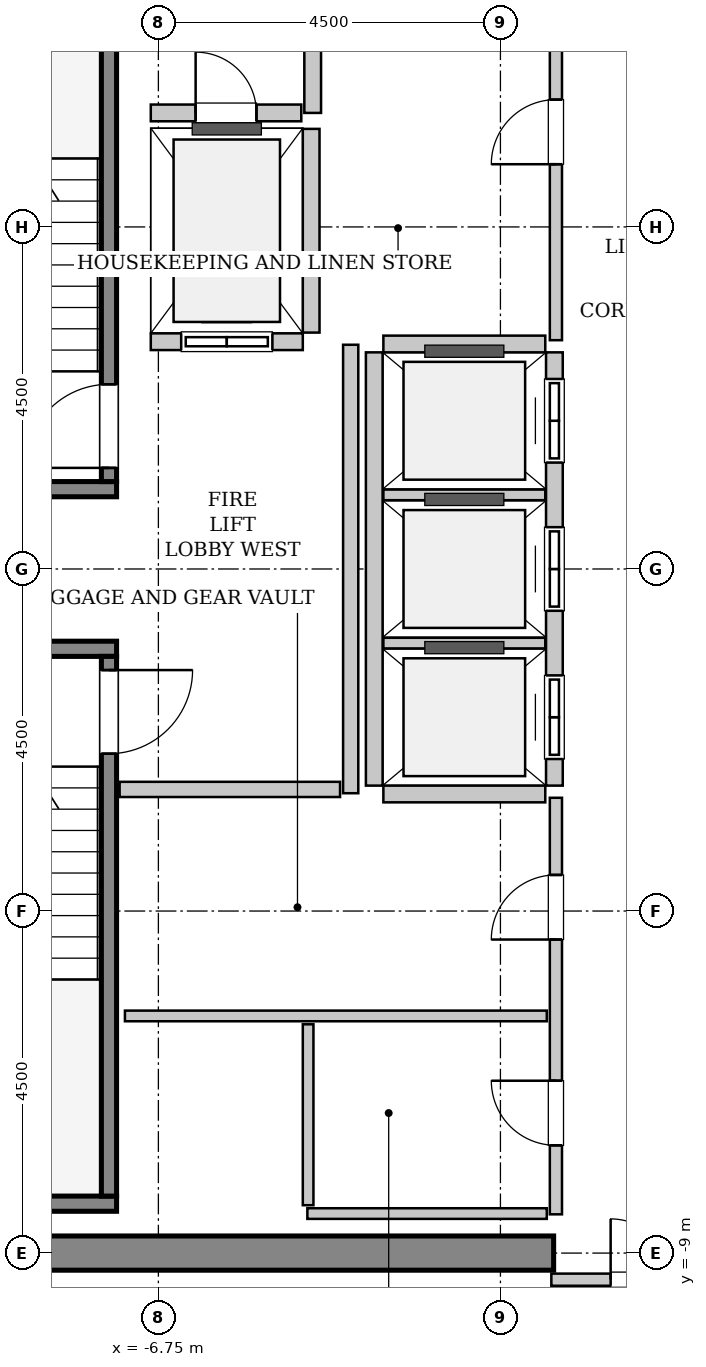
"""IFC4 building model, lengths in metres.
Left out: names, types, materials, properties, quantities, classifications, styles, units other than length and angle.
Written with IfcOpenShell. Run it as: python <this file> out.ifc"""

import sys

from ifc_helpers import new_model, si_unit, direction, frame, frame_2d, origin, place, context, subcontext, project, spatial, rectangle, extrude, source, transform, mapped, element, fill, save


model = new_model("IFC4")
c1 = context("Model", 3, precision=1e-05, world=origin(), true_north=direction((0.0, 1.0)))
c2 = subcontext(c1, "Body", "Model", "MODEL_VIEW")
j1 = project(units=[si_unit("LENGTHUNIT", "METRE"), si_unit("PLANEANGLEUNIT", "RADIAN")], contexts=[c1])
p1 = place(None, origin())
s1 = spatial("IfcSite", under=j1, at=p1, CompositionType="ELEMENT")
p2 = place(p1, origin())
s2 = spatial("IfcBuilding", under=s1, at=p2, CompositionType="ELEMENT")
p3 = place(p2, frame((0.0, 0.0, 306.4)))
s3 = spatial("IfcBuildingStorey", under=s2, at=p3, CompositionType="ELEMENT", Elevation=306.4)
m1 = source(origin(), c2, "Body", "SweptSolid", [
    extrude(rectangle(XDim=9.925, YDim=0.45, at=frame_2d((4.962, 0.0))), origin(), (0.0, 0.0, 1.0), 3.8),
])
p4 = place(p3, frame((-11.475, -9.0, 0.0), z_axis=(0.0, 0.0, 1.0), x_axis=(1.0, 0.0, 0.0)))
e1 = element("IfcWall", 1, at=p4, inside=s3, PredefinedType="SHEAR", context=c2, shape_type="MappedRepresentation", body=[
    mapped(m1, transform((0.0, 0.0, 0.0), x_axis=(1.0, 0.0, 0.0), y_axis=(0.0, 1.0, 0.0), z_axis=(0.0, 0.0, 1.0), scale=1.0)),
])
m2 = source(origin(), c2, "Body", "SweptSolid", [
    extrude(rectangle(XDim=3.4, YDim=0.2, at=frame_2d((1.7, 0.0))), origin(), (0.0, 0.0, 1.0), 3.8),
])
p5 = place(p3, frame((-7.3, 1.05, 0.0), z_axis=(0.0, 0.0, 1.0), x_axis=(-1.0, 0.0, 0.0)))
e2 = element("IfcWall", 2, at=p5, inside=s3, PredefinedType="SOLIDWALL", context=c2, shape_type="MappedRepresentation", body=[
    mapped(m2, transform((0.0, 0.0, 0.0), x_axis=(1.0, 0.0, 0.0), y_axis=(0.0, 1.0, 0.0), z_axis=(0.0, 0.0, 1.0), scale=1.0)),
])
m3 = source(origin(), c2, "Body", "SweptSolid", [
    extrude(rectangle(XDim=7.1, YDim=0.2, at=frame_2d((3.55, 0.0))), origin(), (0.0, 0.0, 1.0), 3.8),
])
p6 = place(p3, frame((-7.4, 1.15, 0.0), z_axis=(0.0, 0.0, 1.0), x_axis=(0.0, 1.0, 0.0)))
e3 = element("IfcWall", 3, at=p6, inside=s3, PredefinedType="SOLIDWALL", context=c2, shape_type="MappedRepresentation", body=[
    mapped(m3, transform((0.0, 0.0, 0.0), x_axis=(1.0, 0.0, 0.0), y_axis=(0.0, 1.0, 0.0), z_axis=(0.0, 0.0, 1.0), scale=1.0)),
])
p7 = place(p6, frame((0.18, 0.0, 0.0)))
e4 = element("IfcOpeningElement", 4, at=p7, cuts=e3, PredefinedType="OPENING", context=c2, shape_type="SweptSolid", body=[
    extrude(rectangle(XDim=1.1, YDim=2.15, at=frame_2d((0.55, 1.075))), frame((0.0, 0.11, 0.0), z_axis=(0.0, -1.0, 0.0), x_axis=(1.0, 0.0, 0.0)), (0.0, 0.0, 1.0), 0.22),
])
p8 = place(p3, frame((-10.7, -1.05, 0.0), z_axis=(0.0, 0.0, 1.0), x_axis=(1.0, 0.0, 0.0)))
e5 = element("IfcWall", 5, at=p8, inside=s3, PredefinedType="SOLIDWALL", context=c2, shape_type="MappedRepresentation", body=[
    mapped(m2, transform((0.0, 0.0, 0.0), x_axis=(1.0, 0.0, 0.0), y_axis=(0.0, 1.0, 0.0), z_axis=(0.0, 0.0, 1.0), scale=1.0)),
])
m4 = source(origin(), c2, "Body", "SweptSolid", [
    extrude(rectangle(XDim=3.73, YDim=0.2, at=frame_2d((1.865, 0.0))), origin(), (0.0, 0.0, 1.0), 3.8),
])
p9 = place(p3, frame((-11.03, -8.35, 0.0), z_axis=(0.0, 0.0, 1.0), x_axis=(1.0, 0.0, 0.0)))
e6 = element("IfcWall", 6, at=p9, inside=s3, PredefinedType="SOLIDWALL", context=c2, shape_type="MappedRepresentation", body=[
    mapped(m4, transform((0.0, 0.0, 0.0), x_axis=(1.0, 0.0, 0.0), y_axis=(0.0, 1.0, 0.0), z_axis=(0.0, 0.0, 1.0), scale=1.0)),
])
p10 = place(p3, frame((-7.4, -1.15, 0.0), z_axis=(0.0, 0.0, 1.0), x_axis=(0.0, -1.0, 0.0)))
e7 = element("IfcWall", 7, at=p10, inside=s3, PredefinedType="SOLIDWALL", context=c2, shape_type="MappedRepresentation", body=[
    mapped(m3, transform((0.0, 0.0, 0.0), x_axis=(1.0, 0.0, 0.0), y_axis=(0.0, 1.0, 0.0), z_axis=(0.0, 0.0, 1.0), scale=1.0)),
])
p11 = place(p10, frame((0.18, 0.0, 0.0)))
e8 = element("IfcOpeningElement", 8, at=p11, cuts=e7, PredefinedType="OPENING", context=c2, shape_type="SweptSolid", body=[
    extrude(rectangle(XDim=1.1, YDim=2.15, at=frame_2d((0.55, 1.075))), frame((0.0, 0.11, 0.0), z_axis=(0.0, -1.0, 0.0), x_axis=(1.0, 0.0, 0.0)), (0.0, 0.0, 1.0), 0.22),
])
m5 = source(origin(), c2, "Body", "SweptSolid", [
    extrude(rectangle(XDim=2.0, YDim=0.22, at=frame_2d((1.0, 0.0))), origin(), (0.0, 0.0, 1.0), 3.535),
])
p12 = place(p3, frame((-6.85, 2.99, 0.0), z_axis=(0.0, 0.0, 1.0), x_axis=(1.0, 0.0, 0.0)))
e9 = element("IfcWall", 9, at=p12, inside=s3, PredefinedType="SOLIDWALL", context=c2, shape_type="MappedRepresentation", body=[
    mapped(m5, transform((0.0, 0.0, 0.0), x_axis=(1.0, 0.0, 0.0), y_axis=(0.0, 1.0, 0.0), z_axis=(0.0, 0.0, 1.0), scale=1.0)),
])
p13 = place(p12, frame((0.4, 0.0, 0.0)))
e10 = element("IfcOpeningElement", 10, at=p13, cuts=e9, PredefinedType="OPENING", context=c2, shape_type="SweptSolid", body=[
    extrude(rectangle(XDim=1.2, YDim=2.2, at=frame_2d((0.6, 1.1))), frame((0.0, 0.12, 0.0), z_axis=(0.0, -1.0, 0.0), x_axis=(1.0, 0.0, 0.0)), (0.0, 0.0, 1.0), 0.24),
])
m6 = source(origin(), c2, "Body", "SweptSolid", [
    extrude(rectangle(XDim=2.68, YDim=0.22, at=frame_2d((1.34, 0.0))), origin(), (0.0, 0.0, 1.0), 3.535),
])
p14 = place(p3, frame((-4.74, 3.11, 0.0), z_axis=(0.0, 0.0, 1.0), x_axis=(0.0, 1.0, 0.0)))
e11 = element("IfcWall", 11, at=p14, inside=s3, PredefinedType="SOLIDWALL", context=c2, shape_type="MappedRepresentation", body=[
    mapped(m6, transform((0.0, 0.0, 0.0), x_axis=(1.0, 0.0, 0.0), y_axis=(0.0, 1.0, 0.0), z_axis=(0.0, 0.0, 1.0), scale=1.0)),
])
m7 = source(origin(), c2, "Body", "SweptSolid", [
    extrude(rectangle(XDim=5.7, YDim=0.22, at=frame_2d((2.85, 0.0))), origin(), (0.0, 0.0, 1.0), 3.535),
])
p15 = place(p3, frame((-1.54, -2.85, 0.0), z_axis=(0.0, 0.0, 1.0), x_axis=(0.0, 1.0, 0.0)))
e12 = element("IfcWall", 12, at=p15, inside=s3, PredefinedType="SOLIDWALL", context=c2, shape_type="MappedRepresentation", body=[
    mapped(m7, transform((0.0, 0.0, 0.0), x_axis=(1.0, 0.0, 0.0), y_axis=(0.0, 1.0, 0.0), z_axis=(0.0, 0.0, 1.0), scale=1.0)),
])
p16 = place(p15, frame((0.35, 0.0, 0.0)))
e13 = element("IfcOpeningElement", 13, at=p16, cuts=e12, PredefinedType="OPENING", context=c2, shape_type="SweptSolid", body=[
    extrude(rectangle(XDim=1.1, YDim=2.2, at=frame_2d((0.55, 1.1))), frame((0.0, 0.12, 0.0), z_axis=(0.0, -1.0, 0.0), x_axis=(1.0, 0.0, 0.0)), (0.0, 0.0, 1.0), 0.24),
])
p17 = place(p15, frame((2.3, 0.0, 0.0)))
e14 = element("IfcOpeningElement", 14, at=p17, cuts=e12, PredefinedType="OPENING", context=c2, shape_type="SweptSolid", body=[
    extrude(rectangle(XDim=1.1, YDim=2.2, at=frame_2d((0.55, 1.1))), frame((0.0, 0.12, 0.0), z_axis=(0.0, -1.0, 0.0), x_axis=(1.0, 0.0, 0.0)), (0.0, 0.0, 1.0), 0.24),
])
p18 = place(p15, frame((4.25, 0.0, 0.0)))
e15 = element("IfcOpeningElement", 15, at=p18, cuts=e12, PredefinedType="OPENING", context=c2, shape_type="SweptSolid", body=[
    extrude(rectangle(XDim=1.1, YDim=2.2, at=frame_2d((0.55, 1.1))), frame((0.0, 0.12, 0.0), z_axis=(0.0, -1.0, 0.0), x_axis=(1.0, 0.0, 0.0)), (0.0, 0.0, 1.0), 0.24),
])
p19 = place(p3, frame((-3.91, 2.85, 0.0), z_axis=(0.0, 0.0, 1.0), x_axis=(0.0, -1.0, 0.0)))
e16 = element("IfcWall", 16, at=p19, inside=s3, PredefinedType="SOLIDWALL", context=c2, shape_type="MappedRepresentation", body=[
    mapped(m7, transform((0.0, 0.0, 0.0), x_axis=(1.0, 0.0, 0.0), y_axis=(0.0, 1.0, 0.0), z_axis=(0.0, 0.0, 1.0), scale=1.0)),
])
m8 = source(origin(), c2, "Body", "SweptSolid", [
    extrude(rectangle(XDim=2.13, YDim=0.22, at=frame_2d((1.065, 0.0))), origin(), (0.0, 0.0, 1.0), 3.535),
])
p20 = place(p3, frame((-3.79, -2.96, 0.0), z_axis=(0.0, 0.0, 1.0), x_axis=(1.0, 0.0, 0.0)))
e17 = element("IfcWall", 17, at=p20, inside=s3, PredefinedType="SOLIDWALL", context=c2, shape_type="MappedRepresentation", body=[
    mapped(m8, transform((0.0, 0.0, 0.0), x_axis=(1.0, 0.0, 0.0), y_axis=(0.0, 1.0, 0.0), z_axis=(0.0, 0.0, 1.0), scale=1.0)),
])
m9 = source(origin(), c2, "Body", "SweptSolid", [
    extrude(rectangle(XDim=2.13, YDim=0.14, at=frame_2d((1.065, 0.0))), origin(), (0.0, 0.0, 1.0), 3.535),
])
for number, where, z_axis, x_axis in (
    (18, (-3.79, -0.975, 0.0), (0.0, 0.0, 1.0), (1.0, 0.0, 0.0)),
    (19, (-3.79, 0.975, 0.0), (0.0, 0.0, 1.0), (1.0, 0.0, 0.0)),
):
    element("IfcWall", number, at=place(p3, frame(where, z_axis=z_axis, x_axis=x_axis)), inside=s3, PredefinedType="PARTITIONING", context=c2, shape_type="MappedRepresentation", body=[
        mapped(m9, transform((0.0, 0.0, 0.0), x_axis=(1.0, 0.0, 0.0), y_axis=(0.0, 1.0, 0.0), z_axis=(0.0, 0.0, 1.0), scale=1.0)),
    ])
p21 = place(p3, frame((-1.66, 2.96, 0.0), z_axis=(0.0, 0.0, 1.0), x_axis=(-1.0, 0.0, 0.0)))
e20 = element("IfcWall", 20, at=p21, inside=s3, PredefinedType="SOLIDWALL", context=c2, shape_type="MappedRepresentation", body=[
    mapped(m8, transform((0.0, 0.0, 0.0), x_axis=(1.0, 0.0, 0.0), y_axis=(0.0, 1.0, 0.0), z_axis=(0.0, 0.0, 1.0), scale=1.0)),
])
m10 = source(origin(), c2, "Body", "SweptSolid", [
    extrude(rectangle(XDim=2.25, YDim=0.22, at=frame_2d((1.125, 0.0))), origin(), (0.0, 0.0, 1.0), 3.535),
])
p22 = place(p3, frame((-4.72, 6.0, 0.0), z_axis=(0.0, 0.0, 1.0), x_axis=(0.0, 1.0, 0.0)))
e21 = element("IfcWall", 21, at=p22, inside=s3, PredefinedType="SOLIDWALL", context=c2, shape_type="MappedRepresentation", body=[
    mapped(m10, transform((0.0, 0.0, 0.0), x_axis=(1.0, 0.0, 0.0), y_axis=(0.0, 1.0, 0.0), z_axis=(0.0, 0.0, 1.0), scale=1.0)),
])
m11 = source(origin(), c2, "Body", "SweptSolid", [
    extrude(rectangle(XDim=1.98, YDim=0.22, at=frame_2d((0.99, 0.0))), origin(), (0.0, 0.0, 1.0), 3.535),
])
p23 = place(p3, frame((-6.85, 6.0, 0.0), z_axis=(0.0, 0.0, 1.0), x_axis=(1.0, 0.0, 0.0)))
e22 = element("IfcWall", 22, at=p23, inside=s3, PredefinedType="SOLIDWALL", context=c2, shape_type="MappedRepresentation", body=[
    mapped(m11, transform((0.0, 0.0, 0.0), x_axis=(1.0, 0.0, 0.0), y_axis=(0.0, 1.0, 0.0), z_axis=(0.0, 0.0, 1.0), scale=1.0)),
])
p24 = place(p23, frame((0.59, 0.0, 0.0)))
e23 = element("IfcOpeningElement", 23, at=p24, cuts=e22, PredefinedType="OPENING", context=c2, shape_type="SweptSolid", body=[
    extrude(rectangle(XDim=0.8, YDim=2.0, at=frame_2d((0.4, 1.0))), frame((0.0, 0.12, 0.0), z_axis=(0.0, -1.0, 0.0), x_axis=(1.0, 0.0, 0.0)), (0.0, 0.0, 1.0), 0.24),
])
m12 = source(origin(), c2, "Body", "SweptSolid", [
    extrude(rectangle(XDim=5.9, YDim=0.2, at=frame_2d((2.95, 0.0))), origin(), (0.0, 0.0, 1.0), 3.535),
])
p25 = place(p3, frame((-4.22, -2.95, 0.0), z_axis=(0.0, 0.0, 1.0), x_axis=(0.0, 1.0, 0.0)))
e24 = element("IfcWall", 24, at=p25, inside=s3, PredefinedType="PARTITIONING", context=c2, shape_type="MappedRepresentation", body=[
    mapped(m12, transform((0.0, 0.0, 0.0), x_axis=(1.0, 0.0, 0.0), y_axis=(0.0, 1.0, 0.0), z_axis=(0.0, 0.0, 1.0), scale=1.0)),
])
m13 = source(origin(), c2, "Body", "SweptSolid", [
    extrude(rectangle(XDim=2.9, YDim=0.2, at=frame_2d((1.45, 0.0))), origin(), (0.0, 0.0, 1.0), 3.535),
])
p26 = place(p3, frame((-7.26, -2.9, 0.0), z_axis=(0.0, 0.0, 1.0), x_axis=(1.0, 0.0, 0.0)))
e25 = element("IfcWall", 25, at=p26, inside=s3, PredefinedType="PARTITIONING", context=c2, shape_type="MappedRepresentation", body=[
    mapped(m13, transform((0.0, 0.0, 0.0), x_axis=(1.0, 0.0, 0.0), y_axis=(0.0, 1.0, 0.0), z_axis=(0.0, 0.0, 1.0), scale=1.0)),
])
m14 = source(origin(), c2, "Body", "SweptSolid", [
    extrude(rectangle(XDim=3.16, YDim=0.16, at=frame_2d((1.58, 0.0))), origin(), (0.0, 0.0, 1.0), 2.625),
])
p27 = place(p3, frame((-1.58, -9.35, 0.0), z_axis=(0.0, 0.0, 1.0), x_axis=(1.0, 0.0, 0.0)))
e26 = element("IfcWall", 26, at=p27, inside=s3, PredefinedType="PARTITIONING", context=c2, shape_type="MappedRepresentation", body=[
    mapped(m14, transform((0.0, 0.0, 0.0), x_axis=(1.0, 0.0, 0.0), y_axis=(0.0, 1.0, 0.0), z_axis=(0.0, 0.0, 1.0), scale=1.0)),
])
p28 = place(p27, frame((0.78, 0.0, 0.0)))
e27 = element("IfcOpeningElement", 27, at=p28, cuts=e26, PredefinedType="OPENING", context=c2, shape_type="SweptSolid", body=[
    extrude(rectangle(XDim=1.6, YDim=2.3, at=frame_2d((0.8, 1.15))), frame((0.0, 0.09, 0.0), z_axis=(0.0, -1.0, 0.0), x_axis=(1.0, 0.0, 0.0)), (0.0, 0.0, 1.0), 0.18),
])
m15 = source(origin(), c2, "Body", "SweptSolid", [
    extrude(rectangle(XDim=5.48, YDim=0.16, at=frame_2d((2.74, 0.0))), origin(), (0.0, 0.0, 1.0), 3.535),
])
p29 = place(p3, frame((-1.52, 3.01, 0.0), z_axis=(0.0, 0.0, 1.0), x_axis=(0.0, 1.0, 0.0)))
e28 = element("IfcWall", 28, at=p29, inside=s3, PredefinedType="PARTITIONING", context=c2, shape_type="MappedRepresentation", body=[
    mapped(m15, transform((0.0, 0.0, 0.0), x_axis=(1.0, 0.0, 0.0), y_axis=(0.0, 1.0, 0.0), z_axis=(0.0, 0.0, 1.0), scale=1.0)),
])
p30 = place(p29, frame((2.315, 0.0, 0.0)))
e29 = element("IfcOpeningElement", 29, at=p30, cuts=e28, PredefinedType="OPENING", context=c2, shape_type="SweptSolid", body=[
    extrude(rectangle(XDim=0.85, YDim=2.1, at=frame_2d((0.425, 1.05))), frame((0.0, 0.09, 0.0), z_axis=(0.0, -1.0, 0.0), x_axis=(1.0, 0.0, 0.0)), (0.0, 0.0, 1.0), 0.18),
])
p31 = place(p3, frame((-1.52, -8.49, 0.0), z_axis=(0.0, 0.0, 1.0), x_axis=(0.0, 1.0, 0.0)))
e30 = element("IfcWall", 30, at=p31, inside=s3, PredefinedType="PARTITIONING", context=c2, shape_type="MappedRepresentation", body=[
    mapped(m15, transform((0.0, 0.0, 0.0), x_axis=(1.0, 0.0, 0.0), y_axis=(0.0, 1.0, 0.0), z_axis=(0.0, 0.0, 1.0), scale=1.0)),
])
p32 = place(p31, frame((0.907, 0.0, 0.0)))
e31 = element("IfcOpeningElement", 31, at=p32, cuts=e30, PredefinedType="OPENING", context=c2, shape_type="SweptSolid", body=[
    extrude(rectangle(XDim=0.85, YDim=2.1, at=frame_2d((0.425, 1.05))), frame((0.0, 0.09, 0.0), z_axis=(0.0, -1.0, 0.0), x_axis=(1.0, 0.0, 0.0)), (0.0, 0.0, 1.0), 0.18),
])
p33 = place(p31, frame((3.615, 0.0, 0.0)))
e32 = element("IfcOpeningElement", 32, at=p33, cuts=e30, PredefinedType="OPENING", context=c2, shape_type="SweptSolid", body=[
    extrude(rectangle(XDim=0.85, YDim=2.1, at=frame_2d((0.425, 1.05))), frame((0.0, 0.09, 0.0), z_axis=(0.0, -1.0, 0.0), x_axis=(1.0, 0.0, 0.0)), (0.0, 0.0, 1.0), 0.18),
])
m16 = source(origin(), c2, "Body", "SweptSolid", [
    extrude(rectangle(XDim=5.55, YDim=0.14, at=frame_2d((2.775, 0.0))), origin(), (0.0, 0.0, 1.0), 3.535),
])
p34 = place(p3, frame((-7.19, -5.88, 0.0), z_axis=(0.0, 0.0, 1.0), x_axis=(1.0, 0.0, 0.0)))
e33 = element("IfcWall", 33, at=p34, inside=s3, PredefinedType="PARTITIONING", context=c2, shape_type="MappedRepresentation", body=[
    mapped(m16, transform((0.0, 0.0, 0.0), x_axis=(1.0, 0.0, 0.0), y_axis=(0.0, 1.0, 0.0), z_axis=(0.0, 0.0, 1.0), scale=1.0)),
])
m17 = source(origin(), c2, "Body", "SweptSolid", [
    extrude(rectangle(XDim=3.15, YDim=0.14, at=frame_2d((1.575, 0.0))), origin(), (0.0, 0.0, 1.0), 3.535),
])
p35 = place(p3, frame((-4.79, -8.48, 0.0), z_axis=(0.0, 0.0, 1.0), x_axis=(1.0, 0.0, 0.0)))
e34 = element("IfcWall", 34, at=p35, inside=s3, PredefinedType="PARTITIONING", context=c2, shape_type="MappedRepresentation", body=[
    mapped(m17, transform((0.0, 0.0, 0.0), x_axis=(1.0, 0.0, 0.0), y_axis=(0.0, 1.0, 0.0), z_axis=(0.0, 0.0, 1.0), scale=1.0)),
])
m18 = source(origin(), c2, "Body", "SweptSolid", [
    extrude(rectangle(XDim=2.38, YDim=0.14, at=frame_2d((1.19, 0.0))), origin(), (0.0, 0.0, 1.0), 3.535),
])
p36 = place(p3, frame((-4.78, -8.37, 0.0), z_axis=(0.0, 0.0, 1.0), x_axis=(0.0, 1.0, 0.0)))
e35 = element("IfcWall", 35, at=p36, inside=s3, PredefinedType="PARTITIONING", context=c2, shape_type="MappedRepresentation", body=[
    mapped(m18, transform((0.0, 0.0, 0.0), x_axis=(1.0, 0.0, 0.0), y_axis=(0.0, 1.0, 0.0), z_axis=(0.0, 0.0, 1.0), scale=1.0)),
])
m19 = source(origin(), c2, "Body", "SweptSolid", [
    extrude(rectangle(XDim=1.1, YDim=2.15, at=frame_2d((0.55, 1.075))), frame((0.0, 0.025, 0.0), z_axis=(0.0, -1.0, 0.0), x_axis=(1.0, 0.0, 0.0)), (0.0, 0.0, 1.0), 0.05),
])
p37 = place(p7, origin())
e36 = element("IfcDoor", 36, at=p37, inside=s3, OperationType="SINGLE_SWING_LEFT", PredefinedType="DOOR", context=c2, shape_type="MappedRepresentation", body=[
    mapped(m19, transform((0.0, 0.0, 0.0), x_axis=(1.0, 0.0, 0.0), y_axis=(0.0, 1.0, 0.0), z_axis=(0.0, 0.0, 1.0), scale=1.0)),
])
fill(e4, e36)
p38 = place(p11, origin())
e37 = element("IfcDoor", 37, at=p38, inside=s3, OperationType="SINGLE_SWING_LEFT", PredefinedType="DOOR", context=c2, shape_type="MappedRepresentation", body=[
    mapped(m19, transform((0.0, 0.0, 0.0), x_axis=(1.0, 0.0, 0.0), y_axis=(0.0, 1.0, 0.0), z_axis=(0.0, 0.0, 1.0), scale=1.0)),
])
fill(e8, e37)
m20 = source(origin(), c2, "Body", "SweptSolid", [
    extrude(rectangle(XDim=1.2, YDim=2.2, at=frame_2d((0.6, 1.1))), frame((0.0, 0.025, 0.0), z_axis=(0.0, -1.0, 0.0), x_axis=(1.0, 0.0, 0.0)), (0.0, 0.0, 1.0), 0.05),
])
p39 = place(p13, origin())
e38 = element("IfcDoor", 38, at=p39, inside=s3, OperationType="SLIDING_TO_LEFT", PredefinedType="DOOR", context=c2, shape_type="MappedRepresentation", body=[
    mapped(m20, transform((0.0, 0.0, 0.0), x_axis=(1.0, 0.0, 0.0), y_axis=(0.0, 1.0, 0.0), z_axis=(0.0, 0.0, 1.0), scale=1.0)),
])
fill(e10, e38)
m21 = source(origin(), c2, "Body", "SweptSolid", [
    extrude(rectangle(XDim=1.1, YDim=2.2, at=frame_2d((0.55, 1.1))), frame((0.0, 0.025, 0.0), z_axis=(0.0, -1.0, 0.0), x_axis=(1.0, 0.0, 0.0)), (0.0, 0.0, 1.0), 0.05),
])
p40 = place(p16, origin())
e39 = element("IfcDoor", 39, at=p40, inside=s3, OperationType="DOUBLE_DOOR_SLIDING", PredefinedType="DOOR", context=c2, shape_type="MappedRepresentation", body=[
    mapped(m21, transform((0.0, 0.0, 0.0), x_axis=(1.0, 0.0, 0.0), y_axis=(0.0, 1.0, 0.0), z_axis=(0.0, 0.0, 1.0), scale=1.0)),
])
fill(e13, e39)
p41 = place(p17, origin())
e40 = element("IfcDoor", 40, at=p41, inside=s3, OperationType="DOUBLE_DOOR_SLIDING", PredefinedType="DOOR", context=c2, shape_type="MappedRepresentation", body=[
    mapped(m21, transform((0.0, 0.0, 0.0), x_axis=(1.0, 0.0, 0.0), y_axis=(0.0, 1.0, 0.0), z_axis=(0.0, 0.0, 1.0), scale=1.0)),
])
fill(e14, e40)
p42 = place(p18, origin())
e41 = element("IfcDoor", 41, at=p42, inside=s3, OperationType="DOUBLE_DOOR_SLIDING", PredefinedType="DOOR", context=c2, shape_type="MappedRepresentation", body=[
    mapped(m21, transform((0.0, 0.0, 0.0), x_axis=(1.0, 0.0, 0.0), y_axis=(0.0, 1.0, 0.0), z_axis=(0.0, 0.0, 1.0), scale=1.0)),
])
fill(e15, e41)
m22 = source(origin(), c2, "Body", "SweptSolid", [
    extrude(rectangle(XDim=0.8, YDim=2.0, at=frame_2d((0.4, 1.0))), frame((0.0, 0.025, 0.0), z_axis=(0.0, -1.0, 0.0), x_axis=(1.0, 0.0, 0.0)), (0.0, 0.0, 1.0), 0.05),
])
p43 = place(p24, origin())
e42 = element("IfcDoor", 42, at=p43, inside=s3, OperationType="SINGLE_SWING_LEFT", PredefinedType="TRAPDOOR", context=c2, shape_type="MappedRepresentation", body=[
    mapped(m22, transform((0.0, 0.0, 0.0), x_axis=(1.0, 0.0, 0.0), y_axis=(0.0, 1.0, 0.0), z_axis=(0.0, 0.0, 1.0), scale=1.0)),
])
fill(e23, e42)
m23 = source(origin(), c2, "Body", "SweptSolid", [
    extrude(rectangle(XDim=1.6, YDim=2.3, at=frame_2d((0.8, 1.15))), frame((0.0, 0.025, 0.0), z_axis=(0.0, -1.0, 0.0), x_axis=(1.0, 0.0, 0.0)), (0.0, 0.0, 1.0), 0.05),
])
p44 = place(p28, origin())
e43 = element("IfcDoor", 43, at=p44, inside=s3, OperationType="DOUBLE_DOOR_SINGLE_SWING", PredefinedType="DOOR", context=c2, shape_type="MappedRepresentation", body=[
    mapped(m23, transform((0.0, 0.0, 0.0), x_axis=(1.0, 0.0, 0.0), y_axis=(0.0, 1.0, 0.0), z_axis=(0.0, 0.0, 1.0), scale=1.0)),
])
fill(e27, e43)
m24 = source(origin(), c2, "Body", "SweptSolid", [
    extrude(rectangle(XDim=0.85, YDim=2.1, at=frame_2d((0.425, 1.05))), frame((0.0, 0.025, 0.0), z_axis=(0.0, -1.0, 0.0), x_axis=(1.0, 0.0, 0.0)), (0.0, 0.0, 1.0), 0.05),
])
p45 = place(p30, origin())
e44 = element("IfcDoor", 44, at=p45, inside=s3, OperationType="SINGLE_SWING_LEFT", PredefinedType="DOOR", context=c2, shape_type="MappedRepresentation", body=[
    mapped(m24, transform((0.0, 0.0, 0.0), x_axis=(1.0, 0.0, 0.0), y_axis=(0.0, 1.0, 0.0), z_axis=(0.0, 0.0, 1.0), scale=1.0)),
])
fill(e29, e44)
p46 = place(p32, origin())
e45 = element("IfcDoor", 45, at=p46, inside=s3, OperationType="SINGLE_SWING_RIGHT", PredefinedType="DOOR", context=c2, shape_type="MappedRepresentation", body=[
    mapped(m24, transform((0.0, 0.0, 0.0), x_axis=(1.0, 0.0, 0.0), y_axis=(0.0, 1.0, 0.0), z_axis=(0.0, 0.0, 1.0), scale=1.0)),
])
fill(e31, e45)
p47 = place(p33, origin())
e46 = element("IfcDoor", 46, at=p47, inside=s3, OperationType="SINGLE_SWING_LEFT", PredefinedType="DOOR", context=c2, shape_type="MappedRepresentation", body=[
    mapped(m24, transform((0.0, 0.0, 0.0), x_axis=(1.0, 0.0, 0.0), y_axis=(0.0, 1.0, 0.0), z_axis=(0.0, 0.0, 1.0), scale=1.0)),
])
fill(e32, e46)
save(model, sys.argv[1])
